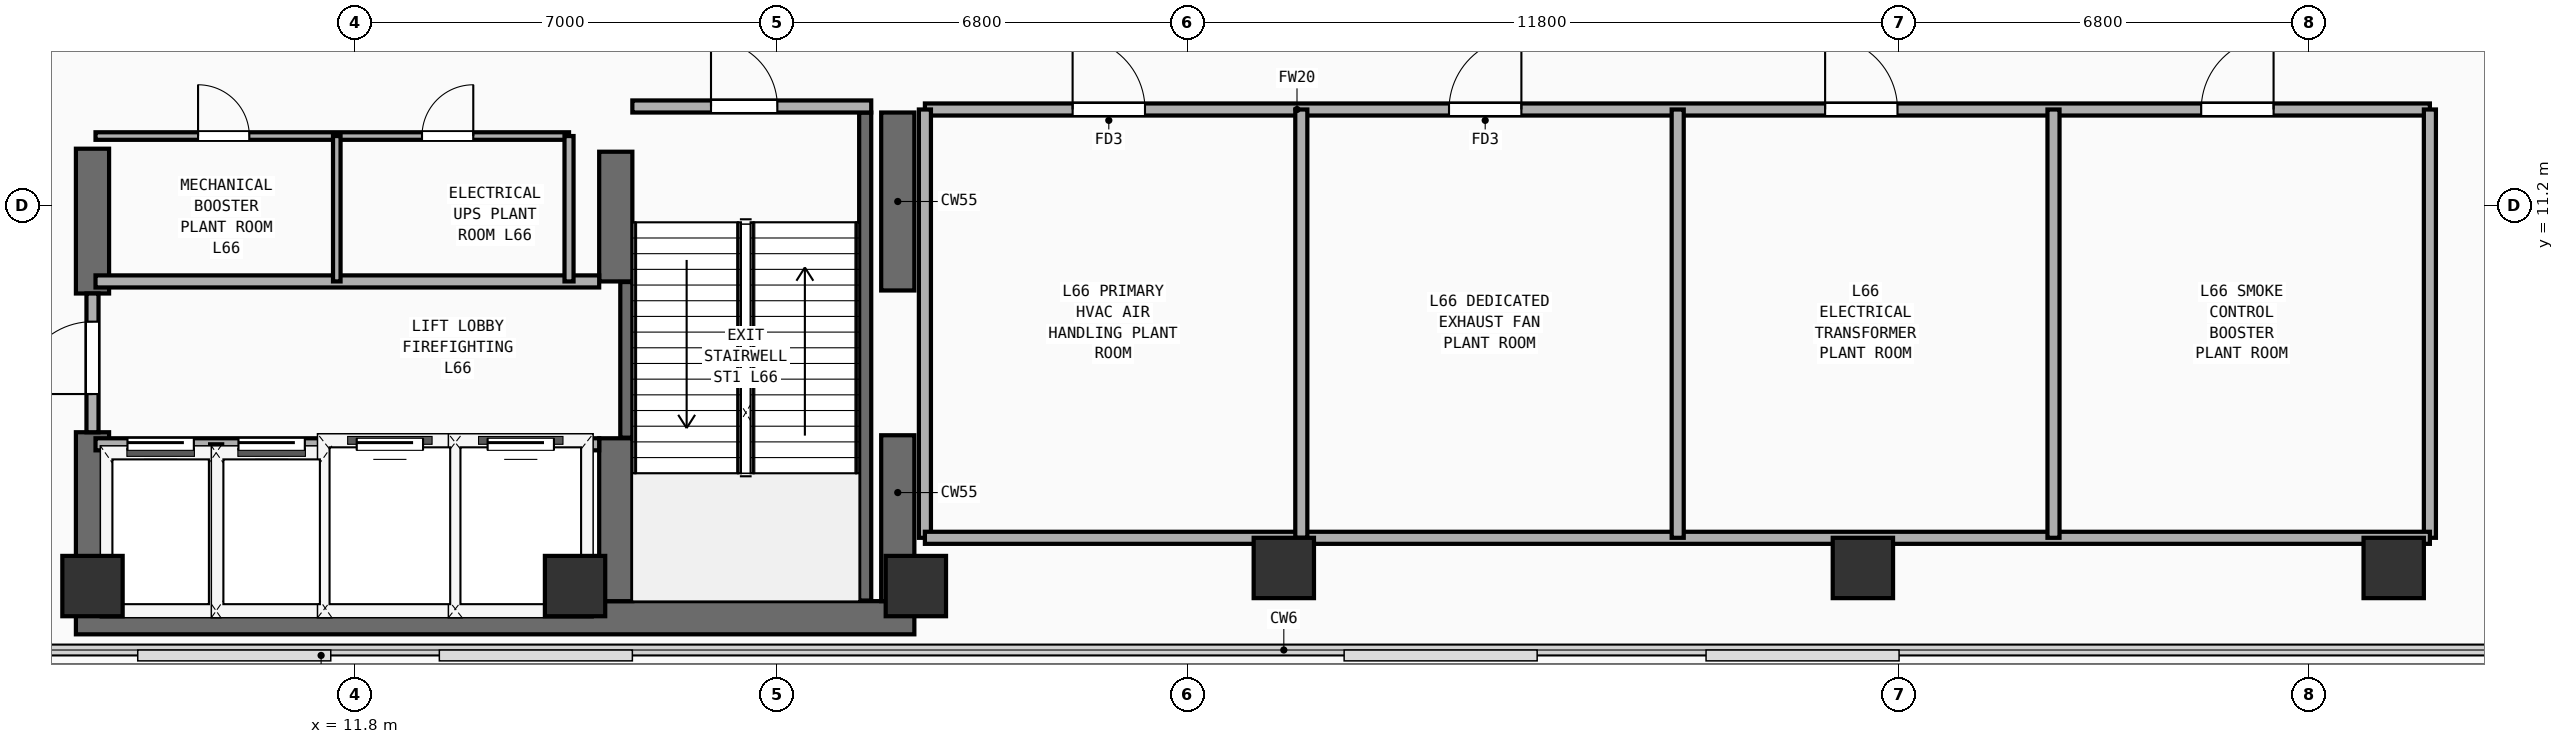
"""IFC4 building model, lengths in metres.
Left out: names, types, materials, properties, quantities, classifications, styles, units other than length and angle.
Written with IfcOpenShell. Run it as: python <this file> out.ifc"""

import sys

from ifc_helpers import new_model, si_unit, direction, frame, frame_2d, origin, origin_2d, place, context, subcontext, project, spatial, rectangle, extrude, element, fill, save


model = new_model("IFC4")
c1 = context("Model", 3, precision=1e-05, world=origin(), true_north=direction((0.0, 1.0)))
c2 = subcontext(c1, "Body", "Model", "MODEL_VIEW")
j1 = project(units=[si_unit("LENGTHUNIT", "METRE"), si_unit("PLANEANGLEUNIT", "RADIAN")], contexts=[c1])
p1 = place(None, origin())
s1 = spatial("IfcSite", under=j1, at=p1, CompositionType="ELEMENT")
p2 = place(p1, origin())
s2 = spatial("IfcBuilding", under=s1, at=p2, CompositionType="ELEMENT")
p3 = place(p2, frame((0.0, 0.0, 257.7)))
s3 = spatial("IfcBuildingStorey", under=s2, at=p3, CompositionType="ELEMENT", Elevation=257.7)
p4 = place(p3, frame((7.175, 4.375, 0.0), z_axis=(0.0, 0.0, 1.0), x_axis=(1.0, 0.0, 0.0)))
e1 = element("IfcWall", 1, at=p4, inside=s3, PredefinedType="SHEAR", context=c2, shape_type="SweptSolid", body=[
    extrude(rectangle(XDim=13.9, YDim=0.55, at=frame_2d((6.95, 0.0))), origin(), (0.0, 0.0, 1.0), 4.86),
])
p5 = place(p3, frame((7.45, 4.65, 0.0), z_axis=(0.0, 0.0, 1.0), x_axis=(0.0, 1.0, 0.0)))
e2 = element("IfcWall", 2, at=p5, inside=s3, PredefinedType="SHEAR", context=c2, shape_type="SweptSolid", body=[
    extrude(rectangle(XDim=2.8, YDim=0.55, at=frame_2d((1.4, 0.0))), origin(), (0.0, 0.0, 1.0), 4.86),
])
p6 = place(p3, frame((7.45, 9.75, 0.0), z_axis=(0.0, 0.0, 1.0), x_axis=(0.0, 1.0, 0.0)))
e3 = element("IfcWall", 3, at=p6, inside=s3, PredefinedType="SHEAR", context=c2, shape_type="SweptSolid", body=[
    extrude(rectangle(XDim=2.4, YDim=0.55, at=frame_2d((1.2, 0.0))), origin(), (0.0, 0.0, 1.0), 4.86),
])
p7 = place(p3, frame((20.8, 4.65, 0.0), z_axis=(0.0, 0.0, 1.0), x_axis=(0.0, 1.0, 0.0)))
e4 = element("IfcWall", 4, at=p7, inside=s3, PredefinedType="SHEAR", context=c2, shape_type="SweptSolid", body=[
    extrude(rectangle(XDim=2.75, YDim=0.55, at=frame_2d((1.375, 0.0))), origin(), (0.0, 0.0, 1.0), 4.86),
])
p8 = place(p3, frame((20.8, 9.8, 0.0), z_axis=(0.0, 0.0, 1.0), x_axis=(0.0, 1.0, 0.0)))
e5 = element("IfcWall", 5, at=p8, inside=s3, PredefinedType="SHEAR", context=c2, shape_type="SweptSolid", body=[
    extrude(rectangle(XDim=2.95, YDim=0.55, at=frame_2d((1.475, 0.0))), origin(), (0.0, 0.0, 1.0), 4.86),
])
p9 = place(p3, frame((16.125, 4.65, 0.0), z_axis=(0.0, 0.0, 1.0), x_axis=(0.0, 1.0, 0.0)))
e6 = element("IfcWall", 6, at=p9, inside=s3, PredefinedType="SHEAR", context=c2, shape_type="SweptSolid", body=[
    extrude(rectangle(XDim=2.7, YDim=0.55, at=frame_2d((1.35, 0.0))), origin(), (0.0, 0.0, 1.0), 4.86),
])
p10 = place(p3, frame((16.125, 9.95, 0.0), z_axis=(0.0, 0.0, 1.0), x_axis=(0.0, 1.0, 0.0)))
e7 = element("IfcWall", 7, at=p10, inside=s3, PredefinedType="SHEAR", context=c2, shape_type="SweptSolid", body=[
    extrude(rectangle(XDim=2.15, YDim=0.55, at=frame_2d((1.075, 0.0))), origin(), (0.0, 0.0, 1.0), 4.86),
])
for number, where, z_axis, x_axis in (
    (8, (7.45, 4.9, 0.0), (0.0, 0.0, 1.0), (1.0, 0.0, 0.0)),
    (9, (15.45, 4.9, 0.0), (0.0, 0.0, 1.0), (1.0, 0.0, 0.0)),
    (10, (21.1, 4.9, 0.0), (0.0, 0.0, 1.0), (1.0, 0.0, 0.0)),
    (11, (27.2, 5.2, 0.0), (0.0, 0.0, 1.0), (1.0, 0.0, 0.0)),
    (12, (36.8, 5.2, 0.0), (0.0, 0.0, 1.0), (1.0, 0.0, 0.0)),
    (13, (45.6, 5.2, 0.0), (0.0, 0.0, 1.0), (1.0, 0.0, 0.0)),
):
    element("IfcColumn", number, at=place(p3, frame(where, z_axis=z_axis, x_axis=x_axis)), inside=s3, PredefinedType="COLUMN", context=c2, shape_type="SweptSolid", body=[
        extrude(rectangle(XDim=1.0, YDim=1.0, at=origin_2d()), origin(), (0.0, 0.0, 1.0), 4.86),
    ])
p11 = place(p3, frame((16.3, 7.36, 0.0), z_axis=(0.0, 0.0, 1.0), x_axis=(0.0, 1.0, 0.0)))
e14 = element("IfcWall", 14, at=p11, inside=s3, PredefinedType="SHEAR", context=c2, shape_type="SweptSolid", body=[
    extrude(rectangle(XDim=2.58, YDim=0.2, at=frame_2d((1.29, 0.0))), origin(), (0.0, 0.0, 1.0), 4.86),
])
p12 = place(p3, frame((20.26, 4.66, 0.0), z_axis=(0.0, 0.0, 1.0), x_axis=(0.0, 1.0, 0.0)))
e15 = element("IfcWall", 15, at=p12, inside=s3, PredefinedType="SHEAR", context=c2, shape_type="SweptSolid", body=[
    extrude(rectangle(XDim=8.09, YDim=0.2, at=frame_2d((4.045, 0.0))), origin(), (0.0, 0.0, 1.0), 4.86),
])
p13 = place(p3, frame((16.4, 12.85, 0.0), z_axis=(0.0, 0.0, 1.0), x_axis=(1.0, 0.0, 0.0)))
e16 = element("IfcWall", 16, at=p13, inside=s3, PredefinedType="PARTITIONING", context=c2, shape_type="SweptSolid", body=[
    extrude(rectangle(XDim=3.96, YDim=0.2, at=frame_2d((1.98, 0.0))), origin(), (0.0, 0.0, 1.0), 4.86),
])
p14 = place(p13, frame((1.304, 0.0, 0.0)))
e17 = element("IfcOpeningElement", 17, at=p14, cuts=e16, PredefinedType="OPENING", context=c2, shape_type="SweptSolid", body=[
    extrude(rectangle(XDim=1.1, YDim=2.2, at=frame_2d((0.55, 1.1))), frame((0.0, 0.11, 0.0), z_axis=(0.0, -1.0, 0.0), x_axis=(1.0, 0.0, 0.0)), (0.0, 0.0, 1.0), 0.22),
])
p15 = place(p3, frame((7.5, 7.25, 0.0), z_axis=(0.0, 0.0, 1.0), x_axis=(1.0, 0.0, 0.0)))
e18 = element("IfcWall", 18, at=p15, inside=s3, PredefinedType="PARTITIONING", context=c2, shape_type="SweptSolid", body=[
    extrude(rectangle(XDim=8.35, YDim=0.2, at=frame_2d((4.175, 0.0))), origin(), (0.0, 0.0, 1.0), 4.86),
])
p16 = place(p15, frame((0.53, 0.0, 0.0)))
e19 = element("IfcOpeningElement", 19, at=p16, cuts=e18, PredefinedType="OPENING", context=c2, shape_type="SweptSolid", body=[
    extrude(rectangle(XDim=1.1, YDim=2.2, at=frame_2d((0.55, 1.1))), frame((0.0, 0.11, 0.0), z_axis=(0.0, -1.0, 0.0), x_axis=(1.0, 0.0, 0.0)), (0.0, 0.0, 1.0), 0.22),
])
p17 = place(p15, frame((2.37, 0.0, 0.0)))
e20 = element("IfcOpeningElement", 20, at=p17, cuts=e18, PredefinedType="OPENING", context=c2, shape_type="SweptSolid", body=[
    extrude(rectangle(XDim=1.1, YDim=2.2, at=frame_2d((0.55, 1.1))), frame((0.0, 0.11, 0.0), z_axis=(0.0, -1.0, 0.0), x_axis=(1.0, 0.0, 0.0)), (0.0, 0.0, 1.0), 0.22),
])
p18 = place(p15, frame((4.33, 0.0, 0.0)))
e21 = element("IfcOpeningElement", 21, at=p18, cuts=e18, PredefinedType="OPENING", context=c2, shape_type="SweptSolid", body=[
    extrude(rectangle(XDim=1.1, YDim=2.2, at=frame_2d((0.55, 1.1))), frame((0.0, 0.11, 0.0), z_axis=(0.0, -1.0, 0.0), x_axis=(1.0, 0.0, 0.0)), (0.0, 0.0, 1.0), 0.22),
])
p19 = place(p15, frame((6.5, 0.0, 0.0)))
e22 = element("IfcOpeningElement", 22, at=p19, cuts=e18, PredefinedType="OPENING", context=c2, shape_type="SweptSolid", body=[
    extrude(rectangle(XDim=1.1, YDim=2.2, at=frame_2d((0.55, 1.1))), frame((0.0, 0.11, 0.0), z_axis=(0.0, -1.0, 0.0), x_axis=(1.0, 0.0, 0.0)), (0.0, 0.0, 1.0), 0.22),
])
p20 = place(p3, frame((7.5, 9.95, 0.0), z_axis=(0.0, 0.0, 1.0), x_axis=(1.0, 0.0, 0.0)))
e23 = element("IfcWall", 23, at=p20, inside=s3, PredefinedType="PARTITIONING", context=c2, shape_type="SweptSolid", body=[
    extrude(rectangle(XDim=8.35, YDim=0.2, at=frame_2d((4.175, 0.0))), origin(), (0.0, 0.0, 1.0), 4.86),
])
for number, where, z_axis, x_axis in (
    (24, (9.5, 4.45, 0.0), (0.0, 0.0, 1.0), (0.0, 1.0, 0.0)),
    (25, (11.36, 4.45, 0.0), (0.0, 0.0, 1.0), (0.0, 1.0, 0.0)),
    (26, (13.46, 4.45, 0.0), (0.0, 0.0, 1.0), (0.0, 1.0, 0.0)),
):
    element("IfcWall", number, at=place(p3, frame(where, z_axis=z_axis, x_axis=x_axis)), inside=s3, PredefinedType="PARTITIONING", context=c2, shape_type="SweptSolid", body=[
        extrude(rectangle(XDim=2.8, YDim=0.2, at=frame_2d((1.4, 0.0))), origin(), (0.0, 0.0, 1.0), 4.86),
    ])
p21 = place(p3, frame((7.45, 7.45, 0.0), z_axis=(0.0, 0.0, 1.0), x_axis=(0.0, 1.0, 0.0)))
e27 = element("IfcWall", 27, at=p21, inside=s3, PredefinedType="PARTITIONING", context=c2, shape_type="SweptSolid", body=[
    extrude(rectangle(XDim=2.3, YDim=0.2, at=frame_2d((1.15, 0.0))), origin(), (0.0, 0.0, 1.0), 3.84),
])
p22 = place(p21, frame((0.633, 0.0, 0.0)))
e28 = element("IfcOpeningElement", 28, at=p22, cuts=e27, PredefinedType="OPENING", context=c2, shape_type="SweptSolid", body=[
    extrude(rectangle(XDim=1.2, YDim=2.25, at=frame_2d((0.6, 1.125))), frame((0.0, 0.11, 0.0), z_axis=(0.0, -1.0, 0.0), x_axis=(1.0, 0.0, 0.0)), (0.0, 0.0, 1.0), 0.22),
])
p23 = place(p3, frame((7.5, 12.36, 0.0), z_axis=(0.0, 0.0, 1.0), x_axis=(1.0, 0.0, 0.0)))
e29 = element("IfcWall", 29, at=p23, inside=s3, PredefinedType="PARTITIONING", context=c2, shape_type="SweptSolid", body=[
    extrude(rectangle(XDim=7.85, YDim=0.125, at=frame_2d((3.925, 0.0))), origin(), (0.0, 0.0, 1.0), 4.86),
])
p24 = place(p23, frame((1.7, 0.0, 0.0)))
e30 = element("IfcOpeningElement", 30, at=p24, cuts=e29, PredefinedType="OPENING", context=c2, shape_type="SweptSolid", body=[
    extrude(rectangle(XDim=0.85, YDim=2.15, at=frame_2d((0.425, 1.075))), frame((0.0, 0.073, 0.0), z_axis=(0.0, -1.0, 0.0), x_axis=(1.0, 0.0, 0.0)), (0.0, 0.0, 1.0), 0.145),
])
p25 = place(p23, frame((5.413, 0.0, 0.0)))
e31 = element("IfcOpeningElement", 31, at=p25, cuts=e29, PredefinedType="OPENING", context=c2, shape_type="SweptSolid", body=[
    extrude(rectangle(XDim=0.85, YDim=2.15, at=frame_2d((0.425, 1.075))), frame((0.0, 0.073, 0.0), z_axis=(0.0, -1.0, 0.0), x_axis=(1.0, 0.0, 0.0)), (0.0, 0.0, 1.0), 0.145),
])
p26 = place(p3, frame((15.35, 9.95, 0.0), z_axis=(0.0, 0.0, 1.0), x_axis=(0.0, 1.0, 0.0)))
e32 = element("IfcWall", 32, at=p26, inside=s3, PredefinedType="PARTITIONING", context=c2, shape_type="SweptSolid", body=[
    extrude(rectangle(XDim=2.41, YDim=0.15, at=frame_2d((1.205, 0.0))), origin(), (0.0, 0.0, 1.0), 4.86),
])
p27 = place(p3, frame((11.5, 9.95, 0.0), z_axis=(0.0, 0.0, 1.0), x_axis=(0.0, 1.0, 0.0)))
e33 = element("IfcWall", 33, at=p27, inside=s3, PredefinedType="PARTITIONING", context=c2, shape_type="SweptSolid", body=[
    extrude(rectangle(XDim=2.41, YDim=0.125, at=frame_2d((1.205, 0.0))), origin(), (0.0, 0.0, 1.0), 4.86),
])
p28 = place(p3, frame((21.25, 12.8, 0.0), z_axis=(0.0, 0.0, 1.0), x_axis=(1.0, 0.0, 0.0)))
e34 = element("IfcWall", 34, at=p28, inside=s3, PredefinedType="PARTITIONING", context=c2, shape_type="SweptSolid", body=[
    extrude(rectangle(XDim=24.95, YDim=0.2, at=frame_2d((12.475, 0.0))), origin(), (0.0, 0.0, 1.0), 4.86),
])
p29 = place(p28, frame((2.448, 0.0, 0.0)))
e35 = element("IfcOpeningElement", 35, at=p29, cuts=e34, PredefinedType="OPENING", context=c2, shape_type="SweptSolid", body=[
    extrude(rectangle(XDim=1.2, YDim=2.25, at=frame_2d((0.6, 1.125))), frame((0.0, 0.11, 0.0), z_axis=(0.0, -1.0, 0.0), x_axis=(1.0, 0.0, 0.0)), (0.0, 0.0, 1.0), 0.22),
])
p30 = place(p28, frame((8.689, 0.0, 0.0)))
e36 = element("IfcOpeningElement", 36, at=p30, cuts=e34, PredefinedType="OPENING", context=c2, shape_type="SweptSolid", body=[
    extrude(rectangle(XDim=1.2, YDim=2.25, at=frame_2d((0.6, 1.125))), frame((0.0, 0.11, 0.0), z_axis=(0.0, -1.0, 0.0), x_axis=(1.0, 0.0, 0.0)), (0.0, 0.0, 1.0), 0.22),
])
p31 = place(p28, frame((14.924, 0.0, 0.0)))
e37 = element("IfcOpeningElement", 37, at=p31, cuts=e34, PredefinedType="OPENING", context=c2, shape_type="SweptSolid", body=[
    extrude(rectangle(XDim=1.2, YDim=2.25, at=frame_2d((0.6, 1.125))), frame((0.0, 0.11, 0.0), z_axis=(0.0, -1.0, 0.0), x_axis=(1.0, 0.0, 0.0)), (0.0, 0.0, 1.0), 0.22),
])
p32 = place(p28, frame((21.159, 0.0, 0.0)))
e38 = element("IfcOpeningElement", 38, at=p32, cuts=e34, PredefinedType="OPENING", context=c2, shape_type="SweptSolid", body=[
    extrude(rectangle(XDim=1.2, YDim=2.25, at=frame_2d((0.6, 1.125))), frame((0.0, 0.11, 0.0), z_axis=(0.0, -1.0, 0.0), x_axis=(1.0, 0.0, 0.0)), (0.0, 0.0, 1.0), 0.22),
])
for number, where, z_axis, x_axis in (
    (39, (21.25, 5.7, 0.0), (0.0, 0.0, 1.0), (0.0, 1.0, 0.0)),
    (40, (46.2, 5.7, 0.0), (0.0, 0.0, 1.0), (0.0, 1.0, 0.0)),
):
    element("IfcWall", number, at=place(p3, frame(where, z_axis=z_axis, x_axis=x_axis)), inside=s3, PredefinedType="PARTITIONING", context=c2, shape_type="SweptSolid", body=[
        extrude(rectangle(XDim=7.1, YDim=0.2, at=frame_2d((3.55, 0.0))), origin(), (0.0, 0.0, 1.0), 4.86),
    ])
p33 = place(p3, frame((21.25, 5.7, 0.0), z_axis=(0.0, 0.0, 1.0), x_axis=(1.0, 0.0, 0.0)))
e41 = element("IfcWall", 41, at=p33, inside=s3, PredefinedType="PARTITIONING", context=c2, shape_type="SweptSolid", body=[
    extrude(rectangle(XDim=24.95, YDim=0.2, at=frame_2d((12.475, 0.0))), origin(), (0.0, 0.0, 1.0), 4.86),
])
p34 = place(p3, frame((27.49, 5.7, 0.0), z_axis=(0.0, 0.0, 1.0), x_axis=(0.0, 1.0, 0.0)))
e42 = element("IfcWall", 42, at=p34, inside=s3, PredefinedType="PARTITIONING", context=c2, shape_type="SweptSolid", body=[
    extrude(rectangle(XDim=7.1, YDim=0.2, at=frame_2d((3.55, 0.0))), origin(), (0.0, 0.0, 1.0), 4.06),
])
for number, where, z_axis, x_axis in (
    (43, (33.73, 5.7, 0.0), (0.0, 0.0, 1.0), (0.0, 1.0, 0.0)),
    (44, (39.96, 5.7, 0.0), (0.0, 0.0, 1.0), (0.0, 1.0, 0.0)),
):
    element("IfcWall", number, at=place(p3, frame(where, z_axis=z_axis, x_axis=x_axis)), inside=s3, PredefinedType="PARTITIONING", context=c2, shape_type="SweptSolid", body=[
        extrude(rectangle(XDim=7.1, YDim=0.2, at=frame_2d((3.55, 0.0))), origin(), (0.0, 0.0, 1.0), 4.86),
    ])
p35 = place(p14, frame((1.1, 0.0, 0.0), z_axis=(0.0, 0.0, 1.0), x_axis=(-1.0, 0.0, 0.0)))
e45 = element("IfcDoor", 45, at=p35, inside=s3, OperationType="SINGLE_SWING_RIGHT", PredefinedType="DOOR", context=c2, shape_type="SweptSolid", body=[
    extrude(rectangle(XDim=1.1, YDim=2.2, at=frame_2d((0.55, 1.1))), frame((0.0, 0.025, 0.0), z_axis=(0.0, -1.0, 0.0), x_axis=(1.0, 0.0, 0.0)), (0.0, 0.0, 1.0), 0.05),
])
fill(e17, e45)
p36 = place(p16, origin())
e46 = element("IfcDoor", 46, at=p36, inside=s3, OperationType="SLIDING_TO_LEFT", PredefinedType="DOOR", context=c2, shape_type="SweptSolid", body=[
    extrude(rectangle(XDim=1.1, YDim=2.2, at=frame_2d((0.55, 1.1))), frame((0.0, 0.025, 0.0), z_axis=(0.0, -1.0, 0.0), x_axis=(1.0, 0.0, 0.0)), (0.0, 0.0, 1.0), 0.05),
])
fill(e19, e46)
p37 = place(p17, origin())
e47 = element("IfcDoor", 47, at=p37, inside=s3, OperationType="SLIDING_TO_LEFT", PredefinedType="DOOR", context=c2, shape_type="SweptSolid", body=[
    extrude(rectangle(XDim=1.1, YDim=2.2, at=frame_2d((0.55, 1.1))), frame((0.0, 0.025, 0.0), z_axis=(0.0, -1.0, 0.0), x_axis=(1.0, 0.0, 0.0)), (0.0, 0.0, 1.0), 0.05),
])
fill(e20, e47)
p38 = place(p18, origin())
e48 = element("IfcDoor", 48, at=p38, inside=s3, OperationType="SLIDING_TO_LEFT", PredefinedType="DOOR", context=c2, shape_type="SweptSolid", body=[
    extrude(rectangle(XDim=1.1, YDim=2.2, at=frame_2d((0.55, 1.1))), frame((0.0, 0.025, 0.0), z_axis=(0.0, -1.0, 0.0), x_axis=(1.0, 0.0, 0.0)), (0.0, 0.0, 1.0), 0.05),
])
fill(e21, e48)
p39 = place(p19, origin())
e49 = element("IfcDoor", 49, at=p39, inside=s3, OperationType="SLIDING_TO_LEFT", PredefinedType="DOOR", context=c2, shape_type="SweptSolid", body=[
    extrude(rectangle(XDim=1.1, YDim=2.2, at=frame_2d((0.55, 1.1))), frame((0.0, 0.025, 0.0), z_axis=(0.0, -1.0, 0.0), x_axis=(1.0, 0.0, 0.0)), (0.0, 0.0, 1.0), 0.05),
])
fill(e22, e49)
p40 = place(p22, frame((1.2, 0.0, 0.0), z_axis=(0.0, 0.0, 1.0), x_axis=(-1.0, 0.0, 0.0)))
e50 = element("IfcDoor", 50, at=p40, inside=s3, OperationType="SINGLE_SWING_RIGHT", PredefinedType="DOOR", context=c2, shape_type="SweptSolid", body=[
    extrude(rectangle(XDim=1.2, YDim=2.25, at=frame_2d((0.6, 1.125))), frame((0.0, 0.025, 0.0), z_axis=(0.0, -1.0, 0.0), x_axis=(1.0, 0.0, 0.0)), (0.0, 0.0, 1.0), 0.05),
])
fill(e28, e50)
p41 = place(p24, origin())
e51 = element("IfcDoor", 51, at=p41, inside=s3, OperationType="SINGLE_SWING_LEFT", PredefinedType="DOOR", context=c2, shape_type="SweptSolid", body=[
    extrude(rectangle(XDim=0.85, YDim=2.15, at=frame_2d((0.425, 1.075))), frame((0.0, 0.025, 0.0), z_axis=(0.0, -1.0, 0.0), x_axis=(1.0, 0.0, 0.0)), (0.0, 0.0, 1.0), 0.05),
])
fill(e30, e51)
p42 = place(p25, origin())
e52 = element("IfcDoor", 52, at=p42, inside=s3, OperationType="SINGLE_SWING_RIGHT", PredefinedType="DOOR", context=c2, shape_type="SweptSolid", body=[
    extrude(rectangle(XDim=0.85, YDim=2.15, at=frame_2d((0.425, 1.075))), frame((0.0, 0.025, 0.0), z_axis=(0.0, -1.0, 0.0), x_axis=(1.0, 0.0, 0.0)), (0.0, 0.0, 1.0), 0.05),
])
fill(e31, e52)
p43 = place(p29, origin())
e53 = element("IfcDoor", 53, at=p43, inside=s3, OperationType="SINGLE_SWING_LEFT", PredefinedType="DOOR", context=c2, shape_type="SweptSolid", body=[
    extrude(rectangle(XDim=1.2, YDim=2.25, at=frame_2d((0.6, 1.125))), frame((0.0, 0.025, 0.0), z_axis=(0.0, -1.0, 0.0), x_axis=(1.0, 0.0, 0.0)), (0.0, 0.0, 1.0), 0.05),
])
fill(e35, e53)
p44 = place(p30, origin())
e54 = element("IfcDoor", 54, at=p44, inside=s3, OperationType="SINGLE_SWING_RIGHT", PredefinedType="DOOR", context=c2, shape_type="SweptSolid", body=[
    extrude(rectangle(XDim=1.2, YDim=2.25, at=frame_2d((0.6, 1.125))), frame((0.0, 0.025, 0.0), z_axis=(0.0, -1.0, 0.0), x_axis=(1.0, 0.0, 0.0)), (0.0, 0.0, 1.0), 0.05),
])
fill(e36, e54)
p45 = place(p31, origin())
e55 = element("IfcDoor", 55, at=p45, inside=s3, OperationType="SINGLE_SWING_LEFT", PredefinedType="DOOR", context=c2, shape_type="SweptSolid", body=[
    extrude(rectangle(XDim=1.2, YDim=2.25, at=frame_2d((0.6, 1.125))), frame((0.0, 0.025, 0.0), z_axis=(0.0, -1.0, 0.0), x_axis=(1.0, 0.0, 0.0)), (0.0, 0.0, 1.0), 0.05),
])
fill(e37, e55)
p46 = place(p32, origin())
e56 = element("IfcDoor", 56, at=p46, inside=s3, OperationType="SINGLE_SWING_RIGHT", PredefinedType="DOOR", context=c2, shape_type="SweptSolid", body=[
    extrude(rectangle(XDim=1.2, YDim=2.25, at=frame_2d((0.6, 1.125))), frame((0.0, 0.025, 0.0), z_axis=(0.0, -1.0, 0.0), x_axis=(1.0, 0.0, 0.0)), (0.0, 0.0, 1.0), 0.05),
])
fill(e38, e56)
save(model, sys.argv[1])
